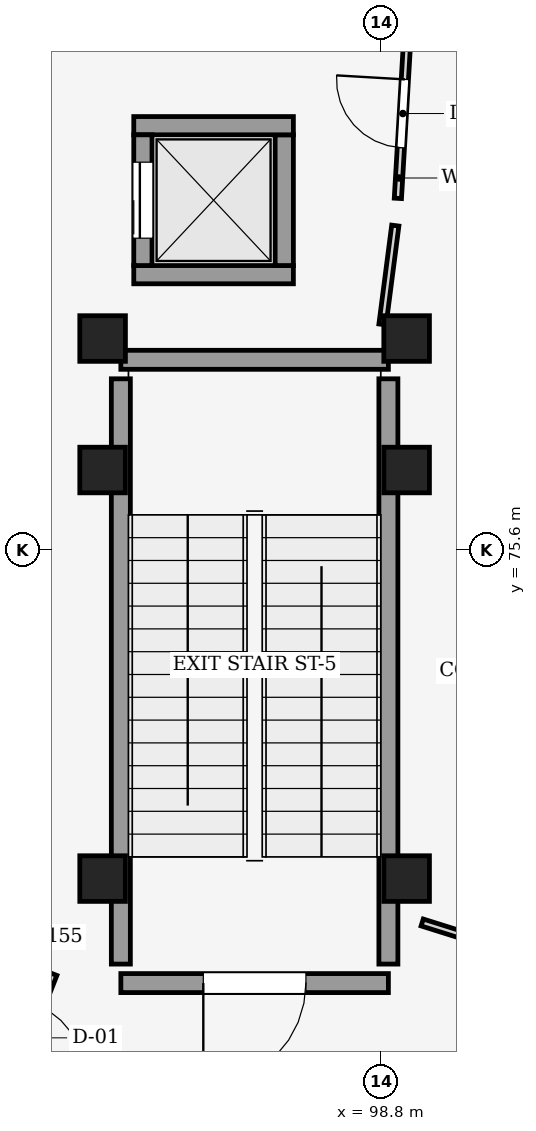
"""IFC4 building model, lengths in metres.
Left out: names, types, materials, properties, quantities, classifications, styles, units other than length and angle.
Written with IfcOpenShell. Run it as: python <this file> out.ifc"""

import sys

from ifc_helpers import new_model, si_unit, direction, frame, frame_2d, origin, origin_2d, place, context, subcontext, project, spatial, rectangle, extrude, element, fill, save


model = new_model("IFC4")
c1 = context("Model", 3, precision=1e-05, world=origin(), true_north=direction((0.0, 1.0)))
c2 = subcontext(c1, "Body", "Model", "MODEL_VIEW")
j1 = project(units=[si_unit("LENGTHUNIT", "METRE"), si_unit("PLANEANGLEUNIT", "RADIAN")], contexts=[c1])
p1 = place(None, origin())
s1 = spatial("IfcSite", under=j1, at=p1, CompositionType="ELEMENT")
p2 = place(p1, origin())
s2 = spatial("IfcBuilding", under=s1, at=p2, CompositionType="ELEMENT")
p3 = place(p2, origin())
s3 = spatial("IfcBuildingStorey", under=s2, at=p3, CompositionType="ELEMENT", Elevation=0.0)
for number, where, z_axis, x_axis in (
    (1, (99.14, 71.275, 0.0), (0.0, 0.0, 1.0), (1.0, 0.0, 0.0)),
    (2, (95.14, 71.275, 0.0), (0.0, 0.0, 1.0), (1.0, 0.0, 0.0)),
    (3, (99.14, 76.65, 0.0), (0.0, 0.0, 1.0), (1.0, 0.0, 0.0)),
    (4, (95.14, 76.65, 0.0), (0.0, 0.0, 1.0), (1.0, 0.0, 0.0)),
    (5, (99.14, 78.38, 0.0), (0.0, 0.0, 1.0), (1.0, 0.0, 0.0)),
    (6, (95.14, 78.38, 0.0), (0.0, 0.0, 1.0), (1.0, 0.0, 0.0)),
):
    element("IfcColumn", number, at=place(p3, frame(where, z_axis=z_axis, x_axis=x_axis)), inside=s3, PredefinedType="COLUMN", context=c2, shape_type="SweptSolid", body=[
        extrude(rectangle(XDim=0.6, YDim=0.6, at=origin_2d()), origin(), (0.0, 0.0, 1.0), 5.1),
    ])
p4 = place(p3, frame((98.9, 69.9, 0.0), z_axis=(0.0, 0.0, 1.0), x_axis=(-1.0, 0.0, 0.0)))
e7 = element("IfcWall", 7, at=p4, inside=s3, PredefinedType="SHEAR", context=c2, shape_type="SweptSolid", body=[
    extrude(rectangle(XDim=3.52, YDim=0.25, at=frame_2d((1.76, 0.0))), origin(), (0.0, 0.0, 1.0), 5.1),
])
p5 = place(p4, frame((1.085, 0.0, 0.0)))
e8 = element("IfcOpeningElement", 8, at=p5, cuts=e7, PredefinedType="OPENING", context=c2, shape_type="SweptSolid", body=[
    extrude(rectangle(XDim=1.35, YDim=2.2, at=frame_2d((0.675, 1.1))), frame((0.0, 0.135, 0.0), z_axis=(0.0, -1.0, 0.0), x_axis=(1.0, 0.0, 0.0)), (0.0, 0.0, 1.0), 0.27),
])
p6 = place(p3, frame((95.38, 70.15, 0.0), z_axis=(0.0, 0.0, 1.0), x_axis=(0.0, 1.0, 0.0)))
e9 = element("IfcWall", 9, at=p6, inside=s3, PredefinedType="SHEAR", context=c2, shape_type="SweptSolid", body=[
    extrude(rectangle(XDim=7.7, YDim=0.25, at=frame_2d((3.85, 0.0))), origin(), (0.0, 0.0, 1.0), 5.1),
])
p7 = place(p3, frame((95.38, 78.1, 0.0), z_axis=(0.0, 0.0, 1.0), x_axis=(1.0, 0.0, 0.0)))
e10 = element("IfcWall", 10, at=p7, inside=s3, PredefinedType="SHEAR", context=c2, shape_type="SweptSolid", body=[
    extrude(rectangle(XDim=3.52, YDim=0.25, at=frame_2d((1.76, 0.0))), origin(), (0.0, 0.0, 1.0), 5.1),
])
p8 = place(p3, frame((98.9, 77.85, 0.0), z_axis=(0.0, 0.0, 1.0), x_axis=(0.0, -1.0, 0.0)))
e11 = element("IfcWall", 11, at=p8, inside=s3, PredefinedType="SHEAR", context=c2, shape_type="SweptSolid", body=[
    extrude(rectangle(XDim=7.7, YDim=0.25, at=frame_2d((3.85, 0.0))), origin(), (0.0, 0.0, 1.0), 5.1),
])
p9 = place(p3, frame((97.65, 79.22, 0.0), z_axis=(0.0, 0.0, 1.0), x_axis=(-1.0, 0.0, 0.0)))
e12 = element("IfcWall", 12, at=p9, inside=s3, PredefinedType="SHEAR", context=c2, shape_type="SweptSolid", body=[
    extrude(rectangle(XDim=2.1, YDim=0.24, at=frame_2d((1.05, 0.0))), origin(), (0.0, 0.0, 1.0), 5.1),
])
p10 = place(p3, frame((97.53, 81.06, 0.0), z_axis=(0.0, 0.0, 1.0), x_axis=(0.0, -1.0, 0.0)))
e13 = element("IfcWall", 13, at=p10, inside=s3, PredefinedType="SHEAR", context=c2, shape_type="SweptSolid", body=[
    extrude(rectangle(XDim=1.72, YDim=0.24, at=frame_2d((0.86, 0.0))), origin(), (0.0, 0.0, 1.0), 5.1),
])
p11 = place(p3, frame((95.55, 81.18, 0.0), z_axis=(0.0, 0.0, 1.0), x_axis=(1.0, 0.0, 0.0)))
e14 = element("IfcWall", 14, at=p11, inside=s3, PredefinedType="SHEAR", context=c2, shape_type="SweptSolid", body=[
    extrude(rectangle(XDim=2.1, YDim=0.24, at=frame_2d((1.05, 0.0))), origin(), (0.0, 0.0, 1.0), 5.1),
])
p12 = place(p3, frame((95.67, 79.34, 0.0), z_axis=(0.0, 0.0, 1.0), x_axis=(0.0, 1.0, 0.0)))
e15 = element("IfcWall", 15, at=p12, inside=s3, PredefinedType="SHEAR", context=c2, shape_type="SweptSolid", body=[
    extrude(rectangle(XDim=1.72, YDim=0.24, at=frame_2d((0.86, 0.0))), origin(), (0.0, 0.0, 1.0), 5.1),
])
p13 = place(p12, frame((0.36, 0.0, 0.0)))
e16 = element("IfcOpeningElement", 16, at=p13, cuts=e15, PredefinedType="OPENING", context=c2, shape_type="SweptSolid", body=[
    extrude(rectangle(XDim=1.0, YDim=2.15, at=frame_2d((0.5, 1.075))), frame((0.0, 0.13, 0.0), z_axis=(0.0, -1.0, 0.0), x_axis=(1.0, 0.0, 0.0)), (0.0, 0.0, 1.0), 0.26),
])
p14 = place(p3, frame((98.822, 78.565, 0.0), z_axis=(0.0, 0.0, 1.0), x_axis=(0.128662543709, 0.991688433857, 0.0)))
e17 = element("IfcWall", 17, at=p14, inside=s3, PredefinedType="PARTITIONING", context=c2, shape_type="SweptSolid", body=[
    extrude(rectangle(XDim=1.311, YDim=0.095, at=frame_2d((0.656, 0.0))), origin(), (0.0, 0.0, 1.0), 2.45),
])
p15 = place(p3, frame((99.025, 80.224, 0.0), z_axis=(0.0, 0.0, 1.0), x_axis=(0.058613248542, 0.998280765664, 0.0)))
e18 = element("IfcWall", 18, at=p15, inside=s3, PredefinedType="PARTITIONING", context=c2, shape_type="SweptSolid", body=[
    extrude(rectangle(XDim=2.237, YDim=0.095, at=frame_2d((1.118, 0.0))), origin(), (0.0, 0.0, 1.0), 4.73),
])
p16 = place(p15, frame((0.668, 0.0, 0.0)))
e19 = element("IfcOpeningElement", 19, at=p16, cuts=e18, PredefinedType="OPENING", context=c2, shape_type="SweptSolid", body=[
    extrude(rectangle(XDim=0.9, YDim=2.1, at=frame_2d((0.45, 1.05))), frame((0.0, 0.057, 0.0), z_axis=(0.0, -1.0, 0.0), x_axis=(1.0, 0.0, 0.0)), (0.0, 0.0, 1.0), 0.115),
])
p17 = place(p3, frame((104.033, 69.223, 0.0), z_axis=(0.0, 0.0, 1.0), x_axis=(-0.953949858631, 0.299966110114, 0.0)))
e20 = element("IfcWall", 20, at=p17, inside=s3, PredefinedType="PARTITIONING", context=c2, shape_type="SweptSolid", body=[
    extrude(rectangle(XDim=4.914, YDim=0.095, at=frame_2d((2.457, 0.0))), origin(), (0.0, 0.0, 1.0), 4.195),
])
p18 = place(p3, frame((94.466, 70.029, 0.0), z_axis=(0.0, 0.0, 1.0), x_axis=(-0.366384258343, -0.93046363456, 0.0)))
e21 = element("IfcWall", 21, at=p18, inside=s3, PredefinedType="PARTITIONING", context=c2, shape_type="SweptSolid", body=[
    extrude(rectangle(XDim=1.826, YDim=0.155, at=frame_2d((0.913, 0.0))), origin(), (0.0, 0.0, 1.0), 4.73),
])
p19 = place(p18, frame((0.463, 0.0, 0.0)))
e22 = element("IfcOpeningElement", 22, at=p19, cuts=e21, PredefinedType="OPENING", context=c2, shape_type="SweptSolid", body=[
    extrude(rectangle(XDim=0.9, YDim=2.1, at=frame_2d((0.45, 1.05))), frame((0.0, 0.087, 0.0), z_axis=(0.0, -1.0, 0.0), x_axis=(1.0, 0.0, 0.0)), (0.0, 0.0, 1.0), 0.175),
])
p20 = place(p5, origin())
e23 = element("IfcDoor", 23, at=p20, inside=s3, OperationType="SINGLE_SWING_RIGHT", PredefinedType="DOOR", context=c2, shape_type="SweptSolid", body=[
    extrude(rectangle(XDim=1.35, YDim=2.2, at=frame_2d((0.675, 1.1))), frame((0.0, 0.025, 0.0), z_axis=(0.0, -1.0, 0.0), x_axis=(1.0, 0.0, 0.0)), (0.0, 0.0, 1.0), 0.05),
])
fill(e8, e23)
p21 = place(p13, origin())
e24 = element("IfcDoor", 24, at=p21, inside=s3, OperationType="SLIDING_TO_LEFT", PredefinedType="DOOR", context=c2, shape_type="SweptSolid", body=[
    extrude(rectangle(XDim=1.0, YDim=2.15, at=frame_2d((0.5, 1.075))), frame((0.0, 0.025, 0.0), z_axis=(0.0, -1.0, 0.0), x_axis=(1.0, 0.0, 0.0)), (0.0, 0.0, 1.0), 0.05),
])
fill(e16, e24)
p22 = place(p16, origin())
e25 = element("IfcDoor", 25, at=p22, inside=s3, OperationType="SINGLE_SWING_RIGHT", PredefinedType="DOOR", context=c2, shape_type="SweptSolid", body=[
    extrude(rectangle(XDim=0.9, YDim=2.1, at=frame_2d((0.45, 1.05))), frame((0.0, 0.025, 0.0), z_axis=(0.0, -1.0, 0.0), x_axis=(1.0, 0.0, 0.0)), (0.0, 0.0, 1.0), 0.05),
])
fill(e19, e25)
save(model, sys.argv[1])
